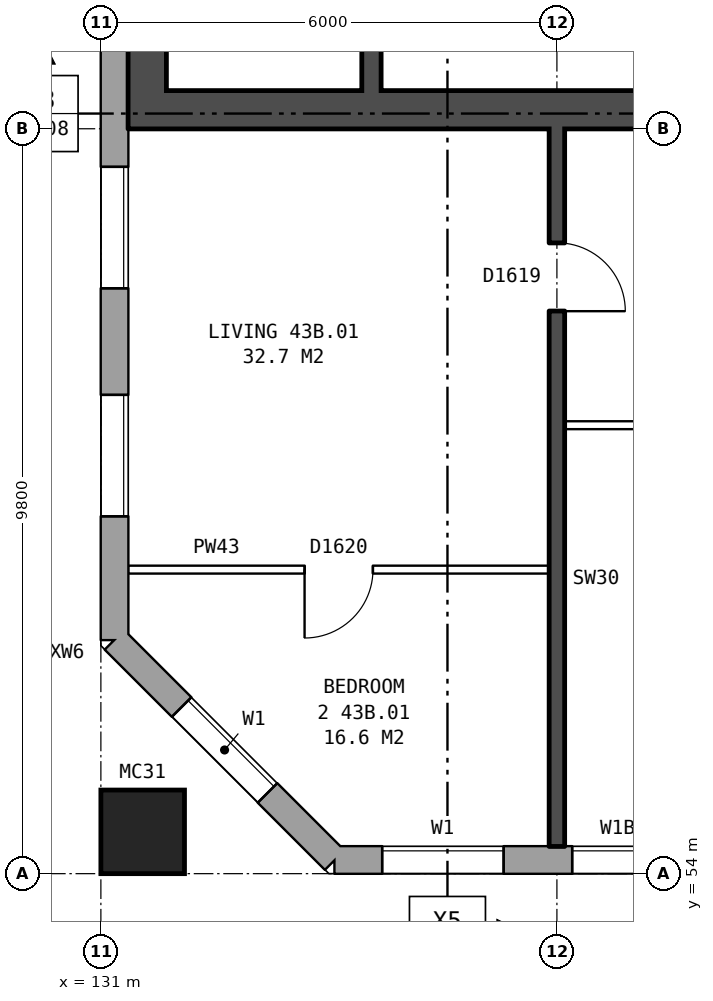
"""IFC4 building model, lengths in metres.
Left out: names, types, materials, properties, quantities, classifications, styles, units other than length and angle.
Written with IfcOpenShell. Run it as: python <this file> out.ifc"""

import sys

from ifc_helpers import new_model, si_unit, direction, frame, frame_2d, origin, origin_2d, place, context, subcontext, project, spatial, rectangle, hollow_rectangle, extrude, element, fill, save


model = new_model("IFC4")
c1 = context("Model", 3, precision=1e-05, world=origin(), true_north=direction((0.0, 1.0)))
c2 = subcontext(c1, "Body", "Model", "MODEL_VIEW")
j1 = project(units=[si_unit("LENGTHUNIT", "METRE"), si_unit("PLANEANGLEUNIT", "RADIAN")], contexts=[c1])
p1 = place(None, origin())
s1 = spatial("IfcSite", under=j1, at=p1, CompositionType="ELEMENT")
p2 = place(p1, origin())
s2 = spatial("IfcBuilding", under=s1, at=p2, CompositionType="ELEMENT")
p3 = place(p2, frame((0.0, 0.0, 154.7)))
s3 = spatial("IfcBuildingStorey", under=s2, at=p3, CompositionType="ELEMENT", Elevation=154.7)
p4 = place(p3, frame((131.55, 54.55, 0.0), z_axis=(0.0, 0.0, 1.0), x_axis=(1.0, 0.0, 0.0)))
e1 = element("IfcColumn", 1, at=p4, inside=s3, PredefinedType="COLUMN", context=c2, shape_type="SweptSolid", body=[
    extrude(hollow_rectangle(XDim=1.1, YDim=1.1, WallThickness=0.06, at=origin_2d()), origin(), (0.0, 0.0, 1.0), 3.1),
])
p5 = place(p3, frame((131.18, 57.075, 0.0), z_axis=(0.0, 0.0, 1.0), x_axis=(0.707106781187, -0.707106781187, 0.0)))
e2 = element("IfcWall", 2, at=p5, inside=s3, PredefinedType="STANDARD", context=c2, shape_type="SweptSolid", body=[
    extrude(rectangle(XDim=4.094, YDim=0.36, at=frame_2d((2.047, 0.0))), origin(), (0.0, 0.0, 1.0), 2.85),
])
p6 = place(p5, frame((1.247, 0.0, 0.8)))
e3 = element("IfcOpeningElement", 3, at=p6, cuts=e2, PredefinedType="OPENING", context=c2, shape_type="SweptSolid", body=[
    extrude(rectangle(XDim=1.6, YDim=1.8, at=frame_2d((0.8, 0.9))), frame((0.0, 0.19, 0.0), z_axis=(0.0, -1.0, 0.0), x_axis=(1.0, 0.0, 0.0)), (0.0, 0.0, 1.0), 0.38),
])
p7 = place(p3, frame((134.075, 54.18, 0.0), z_axis=(0.0, 0.0, 1.0), x_axis=(1.0, 0.0, 0.0)))
e4 = element("IfcWall", 4, at=p7, inside=s3, PredefinedType="STANDARD", context=c2, shape_type="SweptSolid", body=[
    extrude(rectangle(XDim=34.351, YDim=0.36, at=frame_2d((17.175, 0.0))), origin(), (0.0, 0.0, 1.0), 2.85),
])
p8 = place(p7, frame((0.625, 0.0, 0.8)))
e5 = element("IfcOpeningElement", 5, at=p8, cuts=e4, PredefinedType="OPENING", context=c2, shape_type="SweptSolid", body=[
    extrude(rectangle(XDim=1.6, YDim=1.8, at=frame_2d((0.8, 0.9))), frame((0.0, 0.19, 0.0), z_axis=(0.0, -1.0, 0.0), x_axis=(1.0, 0.0, 0.0)), (0.0, 0.0, 1.0), 0.38),
])
p9 = place(p7, frame((3.125, 0.0, 0.8)))
e6 = element("IfcOpeningElement", 6, at=p9, cuts=e4, PredefinedType="OPENING", context=c2, shape_type="SweptSolid", body=[
    extrude(rectangle(XDim=1.2, YDim=1.8, at=frame_2d((0.6, 0.9))), frame((0.0, 0.19, 0.0), z_axis=(0.0, -1.0, 0.0), x_axis=(1.0, 0.0, 0.0)), (0.0, 0.0, 1.0), 0.38),
])
p10 = place(p7, frame((4.625, 0.0, 1.7)))
e7 = element("IfcOpeningElement", 7, at=p10, cuts=e4, PredefinedType="OPENING", context=c2, shape_type="SweptSolid", body=[
    extrude(rectangle(XDim=0.8, YDim=0.9, at=frame_2d((0.4, 0.45))), frame((0.0, 0.19, 0.0), z_axis=(0.0, -1.0, 0.0), x_axis=(1.0, 0.0, 0.0)), (0.0, 0.0, 1.0), 0.38),
])
p11 = place(p7, frame((9.625, 0.0, 0.8)))
e8 = element("IfcOpeningElement", 8, at=p11, cuts=e4, PredefinedType="OPENING", context=c2, shape_type="SweptSolid", body=[
    extrude(rectangle(XDim=1.6, YDim=1.8, at=frame_2d((0.8, 0.9))), frame((0.0, 0.19, 0.0), z_axis=(0.0, -1.0, 0.0), x_axis=(1.0, 0.0, 0.0)), (0.0, 0.0, 1.0), 0.38),
])
p12 = place(p7, frame((12.625, 0.0, 0.8)))
e9 = element("IfcOpeningElement", 9, at=p12, cuts=e4, PredefinedType="OPENING", context=c2, shape_type="SweptSolid", body=[
    extrude(rectangle(XDim=1.6, YDim=1.8, at=frame_2d((0.8, 0.9))), frame((0.0, 0.19, 0.0), z_axis=(0.0, -1.0, 0.0), x_axis=(1.0, 0.0, 0.0)), (0.0, 0.0, 1.0), 0.38),
])
p13 = place(p7, frame((15.625, 0.0, 0.8)))
e10 = element("IfcOpeningElement", 10, at=p13, cuts=e4, PredefinedType="OPENING", context=c2, shape_type="SweptSolid", body=[
    extrude(rectangle(XDim=1.6, YDim=1.8, at=frame_2d((0.8, 0.9))), frame((0.0, 0.19, 0.0), z_axis=(0.0, -1.0, 0.0), x_axis=(1.0, 0.0, 0.0)), (0.0, 0.0, 1.0), 0.38),
])
p14 = place(p7, frame((18.625, 0.0, 0.8)))
e11 = element("IfcOpeningElement", 11, at=p14, cuts=e4, PredefinedType="OPENING", context=c2, shape_type="SweptSolid", body=[
    extrude(rectangle(XDim=1.6, YDim=1.8, at=frame_2d((0.8, 0.9))), frame((0.0, 0.19, 0.0), z_axis=(0.0, -1.0, 0.0), x_axis=(1.0, 0.0, 0.0)), (0.0, 0.0, 1.0), 0.38),
])
p15 = place(p7, frame((21.625, 0.0, 0.8)))
e12 = element("IfcOpeningElement", 12, at=p15, cuts=e4, PredefinedType="OPENING", context=c2, shape_type="SweptSolid", body=[
    extrude(rectangle(XDim=1.6, YDim=1.8, at=frame_2d((0.8, 0.9))), frame((0.0, 0.19, 0.0), z_axis=(0.0, -1.0, 0.0), x_axis=(1.0, 0.0, 0.0)), (0.0, 0.0, 1.0), 0.38),
])
p16 = place(p7, frame((24.625, 0.0, 0.8)))
e13 = element("IfcOpeningElement", 13, at=p16, cuts=e4, PredefinedType="OPENING", context=c2, shape_type="SweptSolid", body=[
    extrude(rectangle(XDim=1.6, YDim=1.8, at=frame_2d((0.8, 0.9))), frame((0.0, 0.19, 0.0), z_axis=(0.0, -1.0, 0.0), x_axis=(1.0, 0.0, 0.0)), (0.0, 0.0, 1.0), 0.38),
])
p17 = place(p7, frame((27.125, 0.0, 0.8)))
e14 = element("IfcOpeningElement", 14, at=p17, cuts=e4, PredefinedType="OPENING", context=c2, shape_type="SweptSolid", body=[
    extrude(rectangle(XDim=0.6, YDim=0.9, at=frame_2d((0.3, 0.45))), frame((0.0, 0.19, 0.0), z_axis=(0.0, -1.0, 0.0), x_axis=(1.0, 0.0, 0.0)), (0.0, 0.0, 1.0), 0.38),
])
p18 = place(p7, frame((30.625, 0.0, 0.8)))
e15 = element("IfcOpeningElement", 15, at=p18, cuts=e4, PredefinedType="OPENING", context=c2, shape_type="SweptSolid", body=[
    extrude(rectangle(XDim=1.6, YDim=1.8, at=frame_2d((0.8, 0.9))), frame((0.0, 0.19, 0.0), z_axis=(0.0, -1.0, 0.0), x_axis=(1.0, 0.0, 0.0)), (0.0, 0.0, 1.0), 0.38),
])
p19 = place(p7, frame((6.625, 0.0, 0.8)))
e16 = element("IfcOpeningElement", 16, at=p19, cuts=e4, PredefinedType="OPENING", context=c2, shape_type="SweptSolid", body=[
    extrude(rectangle(XDim=0.8, YDim=0.9, at=frame_2d((0.4, 0.45))), frame((0.0, 0.19, 0.0), z_axis=(0.0, -1.0, 0.0), x_axis=(1.0, 0.0, 0.0)), (0.0, 0.0, 1.0), 0.38),
])
p20 = place(p7, frame((7.725, 0.0, 0.8)))
e17 = element("IfcOpeningElement", 17, at=p20, cuts=e4, PredefinedType="OPENING", context=c2, shape_type="SweptSolid", body=[
    extrude(rectangle(XDim=1.0, YDim=1.8, at=frame_2d((0.5, 0.9))), frame((0.0, 0.19, 0.0), z_axis=(0.0, -1.0, 0.0), x_axis=(1.0, 0.0, 0.0)), (0.0, 0.0, 1.0), 0.38),
])
p21 = place(p7, frame((28.925, 0.0, 1.7)))
e18 = element("IfcOpeningElement", 18, at=p21, cuts=e4, PredefinedType="OPENING", context=c2, shape_type="SweptSolid", body=[
    extrude(rectangle(XDim=1.4, YDim=0.9, at=frame_2d((0.7, 0.45))), frame((0.0, 0.19, 0.0), z_axis=(0.0, -1.0, 0.0), x_axis=(1.0, 0.0, 0.0)), (0.0, 0.0, 1.0), 0.38),
])
p22 = place(p3, frame((131.18, 82.925, 0.0), z_axis=(0.0, 0.0, 1.0), x_axis=(0.0, -1.0, 0.0)))
e19 = element("IfcWall", 19, at=p22, inside=s3, PredefinedType="STANDARD", context=c2, shape_type="SweptSolid", body=[
    extrude(rectangle(XDim=25.851, YDim=0.36, at=frame_2d((12.925, 0.0))), origin(), (0.0, 0.0, 1.0), 2.85),
])
p23 = place(p22, frame((1.625, 0.0, 0.8)))
e20 = element("IfcOpeningElement", 20, at=p23, cuts=e19, PredefinedType="OPENING", context=c2, shape_type="SweptSolid", body=[
    extrude(rectangle(XDim=1.6, YDim=1.8, at=frame_2d((0.8, 0.9))), frame((0.0, 0.19, 0.0), z_axis=(0.0, -1.0, 0.0), x_axis=(1.0, 0.0, 0.0)), (0.0, 0.0, 1.0), 0.38),
])
p24 = place(p22, frame((4.625, 0.0, 0.8)))
e21 = element("IfcOpeningElement", 21, at=p24, cuts=e19, PredefinedType="OPENING", context=c2, shape_type="SweptSolid", body=[
    extrude(rectangle(XDim=1.6, YDim=1.8, at=frame_2d((0.8, 0.9))), frame((0.0, 0.19, 0.0), z_axis=(0.0, -1.0, 0.0), x_axis=(1.0, 0.0, 0.0)), (0.0, 0.0, 1.0), 0.38),
])
p25 = place(p22, frame((19.625, 0.0, 0.8)))
e22 = element("IfcOpeningElement", 22, at=p25, cuts=e19, PredefinedType="OPENING", context=c2, shape_type="SweptSolid", body=[
    extrude(rectangle(XDim=1.6, YDim=1.8, at=frame_2d((0.8, 0.9))), frame((0.0, 0.19, 0.0), z_axis=(0.0, -1.0, 0.0), x_axis=(1.0, 0.0, 0.0)), (0.0, 0.0, 1.0), 0.38),
])
p26 = place(p22, frame((22.625, 0.0, 0.8)))
e23 = element("IfcOpeningElement", 23, at=p26, cuts=e19, PredefinedType="OPENING", context=c2, shape_type="SweptSolid", body=[
    extrude(rectangle(XDim=1.6, YDim=1.8, at=frame_2d((0.8, 0.9))), frame((0.0, 0.19, 0.0), z_axis=(0.0, -1.0, 0.0), x_axis=(1.0, 0.0, 0.0)), (0.0, 0.0, 1.0), 0.38),
])
p27 = place(p3, frame((131.61, 63.8, 0.0), z_axis=(0.0, 0.0, 1.0), x_axis=(0.0, 1.0, 0.0)))
e24 = element("IfcWall", 24, at=p27, inside=s3, PredefinedType="SHEAR", context=c2, shape_type="SweptSolid", body=[
    extrude(rectangle(XDim=12.4, YDim=0.5, at=frame_2d((6.2, 0.0))), origin(), (0.0, 0.0, 1.0), 2.85),
])
p28 = place(p3, frame((139.26, 64.05, 0.0), z_axis=(0.0, 0.0, 1.0), x_axis=(-1.0, 0.0, 0.0)))
e25 = element("IfcWall", 25, at=p28, inside=s3, PredefinedType="SHEAR", context=c2, shape_type="SweptSolid", body=[
    extrude(rectangle(XDim=7.4, YDim=0.5, at=frame_2d((3.7, 0.0))), origin(), (0.0, 0.0, 1.0), 2.85),
])
p29 = place(p3, frame((134.56, 64.3, 0.0), z_axis=(0.0, 0.0, 1.0), x_axis=(0.0, 1.0, 0.0)))
e26 = element("IfcWall", 26, at=p29, inside=s3, PredefinedType="SHEAR", context=c2, shape_type="SweptSolid", body=[
    extrude(rectangle(XDim=6.825, YDim=0.25, at=frame_2d((3.413, 0.0))), origin(), (0.0, 0.0, 1.0), 2.85),
])
p30 = place(p3, frame((131.36, 58.0, 0.0), z_axis=(0.0, 0.0, 1.0), x_axis=(1.0, 0.0, 0.0)))
e27 = element("IfcWall", 27, at=p30, inside=s3, PredefinedType="PARTITIONING", context=c2, shape_type="SweptSolid", body=[
    extrude(rectangle(XDim=5.54, YDim=0.1, at=frame_2d((2.77, 0.0))), origin(), (0.0, 0.0, 1.0), 2.85),
])
p31 = place(p30, frame((2.32, 0.0, 0.0)))
e28 = element("IfcOpeningElement", 28, at=p31, cuts=e27, PredefinedType="OPENING", context=c2, shape_type="SweptSolid", body=[
    extrude(rectangle(XDim=0.9, YDim=2.1, at=frame_2d((0.45, 1.05))), frame((0.0, 0.06, 0.0), z_axis=(0.0, -1.0, 0.0), x_axis=(1.0, 0.0, 0.0)), (0.0, 0.0, 1.0), 0.12),
])
p32 = place(p3, frame((137.1, 59.9, 0.0), z_axis=(0.0, 0.0, 1.0), x_axis=(1.0, 0.0, 0.0)))
e29 = element("IfcWall", 29, at=p32, inside=s3, PredefinedType="PARTITIONING", context=c2, shape_type="SweptSolid", body=[
    extrude(rectangle(XDim=5.8, YDim=0.1, at=frame_2d((2.9, 0.0))), origin(), (0.0, 0.0, 1.0), 2.85),
])
p33 = place(p32, frame((1.3, 0.0, 0.0)))
e30 = element("IfcOpeningElement", 30, at=p33, cuts=e29, PredefinedType="OPENING", context=c2, shape_type="SweptSolid", body=[
    extrude(rectangle(XDim=0.9, YDim=2.1, at=frame_2d((0.45, 1.05))), frame((0.0, 0.06, 0.0), z_axis=(0.0, -1.0, 0.0), x_axis=(1.0, 0.0, 0.0)), (0.0, 0.0, 1.0), 0.12),
])
p34 = place(p32, frame((4.2, 0.0, 0.0)))
e31 = element("IfcOpeningElement", 31, at=p34, cuts=e29, PredefinedType="OPENING", context=c2, shape_type="SweptSolid", body=[
    extrude(rectangle(XDim=0.9, YDim=2.1, at=frame_2d((0.45, 1.05))), frame((0.0, 0.06, 0.0), z_axis=(0.0, -1.0, 0.0), x_axis=(1.0, 0.0, 0.0)), (0.0, 0.0, 1.0), 0.12),
])
p35 = place(p3, frame((137.0, 54.36, 0.0), z_axis=(0.0, 0.0, 1.0), x_axis=(0.0, 1.0, 0.0)))
e32 = element("IfcWall", 32, at=p35, inside=s3, PredefinedType="SOLIDWALL", context=c2, shape_type="SweptSolid", body=[
    extrude(rectangle(XDim=9.44, YDim=0.2, at=frame_2d((4.72, 0.0))), origin(), (0.0, 0.0, 1.0), 2.85),
])
p36 = place(p35, frame((7.04, 0.0, 0.0)))
e33 = element("IfcOpeningElement", 33, at=p36, cuts=e32, PredefinedType="OPENING", context=c2, shape_type="SweptSolid", body=[
    extrude(rectangle(XDim=0.9, YDim=2.1, at=frame_2d((0.45, 1.05))), frame((0.0, 0.11, 0.0), z_axis=(0.0, -1.0, 0.0), x_axis=(1.0, 0.0, 0.0)), (0.0, 0.0, 1.0), 0.22),
])
p37 = place(p6, origin())
e34 = element("IfcWindow", 34, at=p37, inside=s3, PartitioningType="SINGLE_PANEL", PredefinedType="WINDOW", context=c2, shape_type="SweptSolid", body=[
    extrude(rectangle(XDim=1.6, YDim=1.8, at=frame_2d((0.8, 0.9))), frame((0.0, 0.15, 0.0), z_axis=(0.0, -1.0, 0.0), x_axis=(1.0, 0.0, 0.0)), (0.0, 0.0, 1.0), 0.06),
])
fill(e3, e34)
p38 = place(p8, origin())
e35 = element("IfcWindow", 35, at=p38, inside=s3, PartitioningType="SINGLE_PANEL", PredefinedType="WINDOW", context=c2, shape_type="SweptSolid", body=[
    extrude(rectangle(XDim=1.6, YDim=1.8, at=frame_2d((0.8, 0.9))), frame((0.0, 0.15, 0.0), z_axis=(0.0, -1.0, 0.0), x_axis=(1.0, 0.0, 0.0)), (0.0, 0.0, 1.0), 0.06),
])
fill(e5, e35)
p39 = place(p9, origin())
e36 = element("IfcWindow", 36, at=p39, inside=s3, PartitioningType="SINGLE_PANEL", PredefinedType="WINDOW", context=c2, shape_type="SweptSolid", body=[
    extrude(rectangle(XDim=1.2, YDim=1.8, at=frame_2d((0.6, 0.9))), frame((0.0, 0.15, 0.0), z_axis=(0.0, -1.0, 0.0), x_axis=(1.0, 0.0, 0.0)), (0.0, 0.0, 1.0), 0.06),
])
fill(e6, e36)
p40 = place(p25, origin())
e37 = element("IfcWindow", 37, at=p40, inside=s3, PartitioningType="SINGLE_PANEL", PredefinedType="WINDOW", context=c2, shape_type="SweptSolid", body=[
    extrude(rectangle(XDim=1.6, YDim=1.8, at=frame_2d((0.8, 0.9))), frame((0.0, 0.15, 0.0), z_axis=(0.0, -1.0, 0.0), x_axis=(1.0, 0.0, 0.0)), (0.0, 0.0, 1.0), 0.06),
])
fill(e22, e37)
p41 = place(p26, origin())
e38 = element("IfcWindow", 38, at=p41, inside=s3, PartitioningType="SINGLE_PANEL", PredefinedType="WINDOW", context=c2, shape_type="SweptSolid", body=[
    extrude(rectangle(XDim=1.6, YDim=1.8, at=frame_2d((0.8, 0.9))), frame((0.0, 0.15, 0.0), z_axis=(0.0, -1.0, 0.0), x_axis=(1.0, 0.0, 0.0)), (0.0, 0.0, 1.0), 0.06),
])
fill(e23, e38)
p42 = place(p31, frame((0.9, 0.0, 0.0), z_axis=(0.0, 0.0, 1.0), x_axis=(-1.0, 0.0, 0.0)))
e39 = element("IfcDoor", 39, at=p42, inside=s3, OperationType="SINGLE_SWING_RIGHT", PredefinedType="DOOR", context=c2, shape_type="SweptSolid", body=[
    extrude(rectangle(XDim=0.9, YDim=2.1, at=frame_2d((0.45, 1.05))), frame((0.0, 0.025, 0.0), z_axis=(0.0, -1.0, 0.0), x_axis=(1.0, 0.0, 0.0)), (0.0, 0.0, 1.0), 0.05),
])
fill(e28, e39)
p43 = place(p36, frame((0.9, 0.0, 0.0), z_axis=(0.0, 0.0, 1.0), x_axis=(-1.0, 0.0, 0.0)))
e40 = element("IfcDoor", 40, at=p43, inside=s3, OperationType="SINGLE_SWING_RIGHT", PredefinedType="DOOR", context=c2, shape_type="SweptSolid", body=[
    extrude(rectangle(XDim=0.9, YDim=2.1, at=frame_2d((0.45, 1.05))), frame((0.0, 0.025, 0.0), z_axis=(0.0, -1.0, 0.0), x_axis=(1.0, 0.0, 0.0)), (0.0, 0.0, 1.0), 0.05),
])
fill(e33, e40)
save(model, sys.argv[1])
